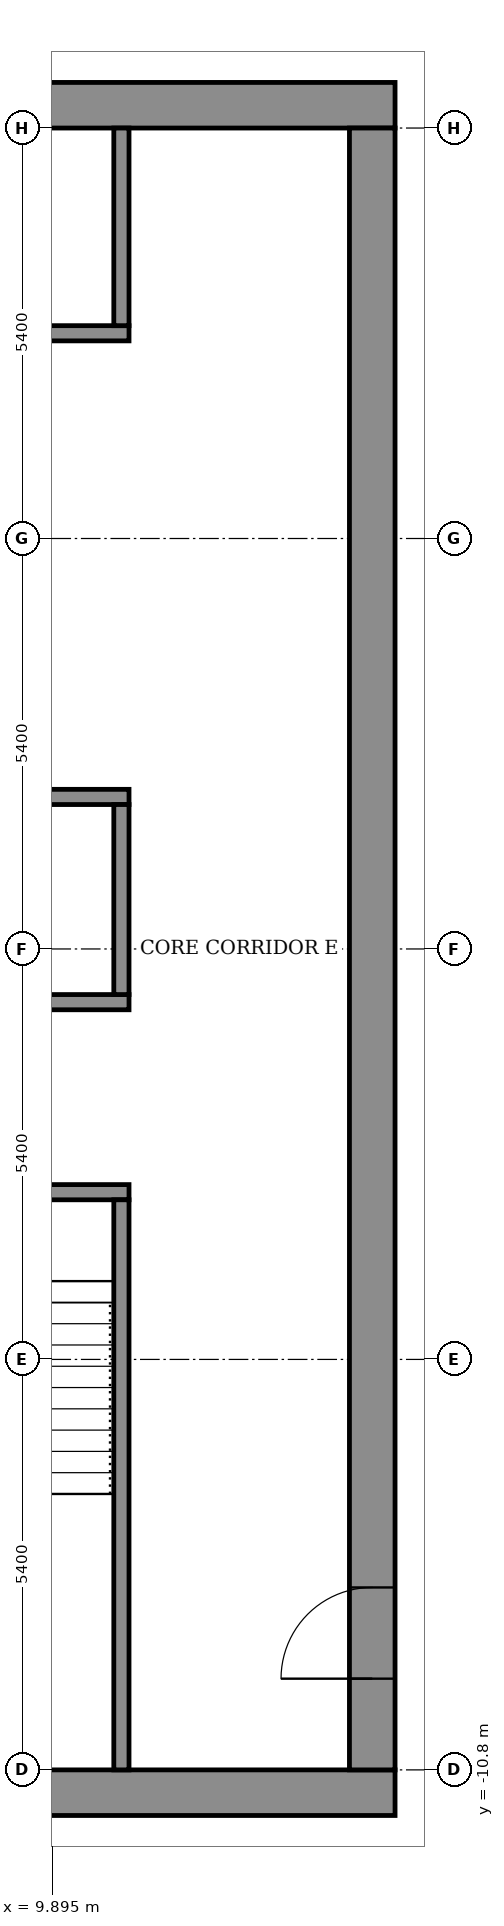
"""IFC4 building model, lengths in metres.
Left out: names, types, materials, properties, quantities, classifications, styles, units other than length and angle.
Written with IfcOpenShell. Run it as: python <this file> out.ifc"""

import sys

from ifc_helpers import new_model, si_unit, direction, frame, frame_2d, origin, place, context, subcontext, project, spatial, rectangle, extrude, element, fill, save


model = new_model("IFC4")
c1 = context("Model", 3, precision=1e-05, world=origin(), true_north=direction((0.0, 1.0)))
c2 = subcontext(c1, "Body", "Model", "MODEL_VIEW")
j1 = project(units=[si_unit("LENGTHUNIT", "METRE"), si_unit("PLANEANGLEUNIT", "RADIAN")], contexts=[c1])
p1 = place(None, origin())
s1 = spatial("IfcSite", under=j1, at=p1, CompositionType="ELEMENT")
p2 = place(p1, origin())
s2 = spatial("IfcBuilding", under=s1, at=p2, CompositionType="ELEMENT")
p3 = place(p2, frame((0.0, 0.0, 334.3)))
s3 = spatial("IfcBuildingStorey", under=s2, at=p3, CompositionType="ELEMENT", Elevation=334.3)
for number, where, z_axis, x_axis in (
    (1, (-14.4, -11.1, 0.0), (0.0, 0.0, 1.0), (1.0, 0.0, 0.0)),
    (2, (-14.4, 11.1, 0.0), (0.0, 0.0, 1.0), (1.0, 0.0, 0.0)),
):
    element("IfcWall", number, at=place(p3, frame(where, z_axis=z_axis, x_axis=x_axis)), inside=s3, PredefinedType="SHEAR", context=c2, shape_type="SweptSolid", body=[
        extrude(rectangle(XDim=28.8, YDim=0.6, at=frame_2d((14.4, 0.0))), origin(), (0.0, 0.0, 1.0), 3.6),
    ])
p4 = place(p3, frame((14.1, -10.8, 0.0), z_axis=(0.0, 0.0, 1.0), x_axis=(0.0, 1.0, 0.0)))
e3 = element("IfcWall", 3, at=p4, inside=s3, PredefinedType="SHEAR", context=c2, shape_type="SweptSolid", body=[
    extrude(rectangle(XDim=21.6, YDim=0.6, at=frame_2d((10.8, 0.0))), origin(), (0.0, 0.0, 1.0), 3.6),
])
p5 = place(p4, frame((1.2, 0.0, 0.0)))
e4 = element("IfcOpeningElement", 4, at=p5, cuts=e3, PredefinedType="OPENING", context=c2, shape_type="SweptSolid", body=[
    extrude(rectangle(XDim=1.2, YDim=2.1, at=frame_2d((0.6, 1.05))), frame((0.0, 0.31, 0.0), z_axis=(0.0, -1.0, 0.0), x_axis=(1.0, 0.0, 0.0)), (0.0, 0.0, 1.0), 0.62),
])
p6 = place(p3, frame((-10.9, -3.2, 0.0), z_axis=(0.0, 0.0, 1.0), x_axis=(1.0, 0.0, 0.0)))
e5 = element("IfcWall", 5, at=p6, inside=s3, PredefinedType="SHEAR", context=c2, shape_type="SweptSolid", body=[
    extrude(rectangle(XDim=21.8, YDim=0.2, at=frame_2d((10.9, 0.0))), origin(), (0.0, 0.0, 1.0), 3.05),
])
p7 = place(p6, frame((1.075, 0.0, 0.0)))
e6 = element("IfcOpeningElement", 6, at=p7, cuts=e5, PredefinedType="OPENING", context=c2, shape_type="SweptSolid", body=[
    extrude(rectangle(XDim=1.1, YDim=2.1, at=frame_2d((0.55, 1.05))), frame((0.0, 0.11, 0.0), z_axis=(0.0, -1.0, 0.0), x_axis=(1.0, 0.0, 0.0)), (0.0, 0.0, 1.0), 0.22),
])
p8 = place(p6, frame((10.325, 0.0, 0.0)))
e7 = element("IfcOpeningElement", 7, at=p8, cuts=e5, PredefinedType="OPENING", context=c2, shape_type="SweptSolid", body=[
    extrude(rectangle(XDim=1.1, YDim=2.1, at=frame_2d((0.55, 1.05))), frame((0.0, 0.11, 0.0), z_axis=(0.0, -1.0, 0.0), x_axis=(1.0, 0.0, 0.0)), (0.0, 0.0, 1.0), 0.22),
])
p9 = place(p6, frame((19.625, 0.0, 0.0)))
e8 = element("IfcOpeningElement", 8, at=p9, cuts=e5, PredefinedType="OPENING", context=c2, shape_type="SweptSolid", body=[
    extrude(rectangle(XDim=1.1, YDim=2.1, at=frame_2d((0.55, 1.05))), frame((0.0, 0.11, 0.0), z_axis=(0.0, -1.0, 0.0), x_axis=(1.0, 0.0, 0.0)), (0.0, 0.0, 1.0), 0.22),
])
p10 = place(p6, frame((5.7, 0.0, 0.0)))
e9 = element("IfcOpeningElement", 9, at=p10, cuts=e5, PredefinedType="OPENING", context=c2, shape_type="SweptSolid", body=[
    extrude(rectangle(XDim=1.1, YDim=2.1, at=frame_2d((0.55, 1.05))), frame((0.0, 0.11, 0.0), z_axis=(0.0, -1.0, 0.0), x_axis=(1.0, 0.0, 0.0)), (0.0, 0.0, 1.0), 0.22),
])
p11 = place(p6, frame((14.975, 0.0, 0.0)))
e10 = element("IfcOpeningElement", 10, at=p11, cuts=e5, PredefinedType="OPENING", context=c2, shape_type="SweptSolid", body=[
    extrude(rectangle(XDim=1.1, YDim=2.1, at=frame_2d((0.55, 1.05))), frame((0.0, 0.11, 0.0), z_axis=(0.0, -1.0, 0.0), x_axis=(1.0, 0.0, 0.0)), (0.0, 0.0, 1.0), 0.22),
])
p12 = place(p3, frame((-10.9, -0.7, 0.0), z_axis=(0.0, 0.0, 1.0), x_axis=(1.0, 0.0, 0.0)))
e11 = element("IfcWall", 11, at=p12, inside=s3, PredefinedType="SHEAR", context=c2, shape_type="SweptSolid", body=[
    extrude(rectangle(XDim=21.8, YDim=0.2, at=frame_2d((10.9, 0.0))), origin(), (0.0, 0.0, 1.0), 3.05),
])
p13 = place(p3, frame((-10.9, 2.0, 0.0), z_axis=(0.0, 0.0, 1.0), x_axis=(1.0, 0.0, 0.0)))
e12 = element("IfcWall", 12, at=p13, inside=s3, PredefinedType="SHEAR", context=c2, shape_type="SweptSolid", body=[
    extrude(rectangle(XDim=21.8, YDim=0.2, at=frame_2d((10.9, 0.0))), origin(), (0.0, 0.0, 1.0), 3.05),
])
p14 = place(p13, frame((4.95, 0.0, 0.0)))
e13 = element("IfcOpeningElement", 13, at=p14, cuts=e12, PredefinedType="OPENING", context=c2, shape_type="SweptSolid", body=[
    extrude(rectangle(XDim=1.1, YDim=2.1, at=frame_2d((0.55, 1.05))), frame((0.0, 0.11, 0.0), z_axis=(0.0, -1.0, 0.0), x_axis=(1.0, 0.0, 0.0)), (0.0, 0.0, 1.0), 0.22),
])
p15 = place(p13, frame((7.65, 0.0, 0.0)))
e14 = element("IfcOpeningElement", 14, at=p15, cuts=e12, PredefinedType="OPENING", context=c2, shape_type="SweptSolid", body=[
    extrude(rectangle(XDim=1.1, YDim=2.1, at=frame_2d((0.55, 1.05))), frame((0.0, 0.11, 0.0), z_axis=(0.0, -1.0, 0.0), x_axis=(1.0, 0.0, 0.0)), (0.0, 0.0, 1.0), 0.22),
])
p16 = place(p13, frame((10.35, 0.0, 0.0)))
e15 = element("IfcOpeningElement", 15, at=p16, cuts=e12, PredefinedType="OPENING", context=c2, shape_type="SweptSolid", body=[
    extrude(rectangle(XDim=1.1, YDim=2.1, at=frame_2d((0.55, 1.05))), frame((0.0, 0.11, 0.0), z_axis=(0.0, -1.0, 0.0), x_axis=(1.0, 0.0, 0.0)), (0.0, 0.0, 1.0), 0.22),
])
p17 = place(p13, frame((1.675, 0.0, 0.0)))
e16 = element("IfcOpeningElement", 16, at=p17, cuts=e12, PredefinedType="OPENING", context=c2, shape_type="SweptSolid", body=[
    extrude(rectangle(XDim=0.9, YDim=2.1, at=frame_2d((0.45, 1.05))), frame((0.0, 0.11, 0.0), z_axis=(0.0, -1.0, 0.0), x_axis=(1.0, 0.0, 0.0)), (0.0, 0.0, 1.0), 0.22),
])
p18 = place(p13, frame((14.5, 0.0, 0.0)))
e17 = element("IfcOpeningElement", 17, at=p18, cuts=e12, PredefinedType="OPENING", context=c2, shape_type="SweptSolid", body=[
    extrude(rectangle(XDim=0.9, YDim=2.1, at=frame_2d((0.45, 1.05))), frame((0.0, 0.11, 0.0), z_axis=(0.0, -1.0, 0.0), x_axis=(1.0, 0.0, 0.0)), (0.0, 0.0, 1.0), 0.22),
])
p19 = place(p13, frame((19.225, 0.0, 0.0)))
e18 = element("IfcOpeningElement", 18, at=p19, cuts=e12, PredefinedType="OPENING", context=c2, shape_type="SweptSolid", body=[
    extrude(rectangle(XDim=0.9, YDim=2.1, at=frame_2d((0.45, 1.05))), frame((0.0, 0.11, 0.0), z_axis=(0.0, -1.0, 0.0), x_axis=(1.0, 0.0, 0.0)), (0.0, 0.0, 1.0), 0.22),
])
p20 = place(p3, frame((-10.9, 8.1, 0.0), z_axis=(0.0, 0.0, 1.0), x_axis=(1.0, 0.0, 0.0)))
e19 = element("IfcWall", 19, at=p20, inside=s3, PredefinedType="SHEAR", context=c2, shape_type="SweptSolid", body=[
    extrude(rectangle(XDim=21.8, YDim=0.2, at=frame_2d((10.9, 0.0))), origin(), (0.0, 0.0, 1.0), 3.05),
])
p21 = place(p20, frame((4.95, 0.0, 0.0)))
e20 = element("IfcOpeningElement", 20, at=p21, cuts=e19, PredefinedType="OPENING", context=c2, shape_type="SweptSolid", body=[
    extrude(rectangle(XDim=1.1, YDim=2.1, at=frame_2d((0.55, 1.05))), frame((0.0, 0.11, 0.0), z_axis=(0.0, -1.0, 0.0), x_axis=(1.0, 0.0, 0.0)), (0.0, 0.0, 1.0), 0.22),
])
p22 = place(p20, frame((7.65, 0.0, 0.0)))
e21 = element("IfcOpeningElement", 21, at=p22, cuts=e19, PredefinedType="OPENING", context=c2, shape_type="SweptSolid", body=[
    extrude(rectangle(XDim=1.1, YDim=2.1, at=frame_2d((0.55, 1.05))), frame((0.0, 0.11, 0.0), z_axis=(0.0, -1.0, 0.0), x_axis=(1.0, 0.0, 0.0)), (0.0, 0.0, 1.0), 0.22),
])
p23 = place(p20, frame((10.35, 0.0, 0.0)))
e22 = element("IfcOpeningElement", 22, at=p23, cuts=e19, PredefinedType="OPENING", context=c2, shape_type="SweptSolid", body=[
    extrude(rectangle(XDim=1.1, YDim=2.1, at=frame_2d((0.55, 1.05))), frame((0.0, 0.11, 0.0), z_axis=(0.0, -1.0, 0.0), x_axis=(1.0, 0.0, 0.0)), (0.0, 0.0, 1.0), 0.22),
])
p24 = place(p20, frame((1.675, 0.0, 0.0)))
e23 = element("IfcOpeningElement", 23, at=p24, cuts=e19, PredefinedType="OPENING", context=c2, shape_type="SweptSolid", body=[
    extrude(rectangle(XDim=0.9, YDim=2.1, at=frame_2d((0.45, 1.05))), frame((0.0, 0.11, 0.0), z_axis=(0.0, -1.0, 0.0), x_axis=(1.0, 0.0, 0.0)), (0.0, 0.0, 1.0), 0.22),
])
p25 = place(p20, frame((14.5, 0.0, 0.0)))
e24 = element("IfcOpeningElement", 24, at=p25, cuts=e19, PredefinedType="OPENING", context=c2, shape_type="SweptSolid", body=[
    extrude(rectangle(XDim=0.9, YDim=2.1, at=frame_2d((0.45, 1.05))), frame((0.0, 0.11, 0.0), z_axis=(0.0, -1.0, 0.0), x_axis=(1.0, 0.0, 0.0)), (0.0, 0.0, 1.0), 0.22),
])
p26 = place(p20, frame((19.225, 0.0, 0.0)))
e25 = element("IfcOpeningElement", 25, at=p26, cuts=e19, PredefinedType="OPENING", context=c2, shape_type="SweptSolid", body=[
    extrude(rectangle(XDim=0.9, YDim=2.1, at=frame_2d((0.45, 1.05))), frame((0.0, 0.11, 0.0), z_axis=(0.0, -1.0, 0.0), x_axis=(1.0, 0.0, 0.0)), (0.0, 0.0, 1.0), 0.22),
])
p27 = place(p3, frame((10.8, -10.8, 0.0), z_axis=(0.0, 0.0, 1.0), x_axis=(0.0, 1.0, 0.0)))
e26 = element("IfcWall", 26, at=p27, inside=s3, PredefinedType="SHEAR", context=c2, shape_type="SweptSolid", body=[
    extrude(rectangle(XDim=7.5, YDim=0.2, at=frame_2d((3.75, 0.0))), origin(), (0.0, 0.0, 1.0), 3.05),
])
p28 = place(p3, frame((10.8, -0.6, 0.0), z_axis=(0.0, 0.0, 1.0), x_axis=(0.0, 1.0, 0.0)))
e27 = element("IfcWall", 27, at=p28, inside=s3, PredefinedType="STANDARD", context=c2, shape_type="SweptSolid", body=[
    extrude(rectangle(XDim=2.5, YDim=0.2, at=frame_2d((1.25, 0.0))), origin(), (0.0, 0.0, 1.0), 3.05),
])
p29 = place(p3, frame((10.8, 8.2, 0.0), z_axis=(0.0, 0.0, 1.0), x_axis=(0.0, 1.0, 0.0)))
e28 = element("IfcWall", 28, at=p29, inside=s3, PredefinedType="STANDARD", context=c2, shape_type="SweptSolid", body=[
    extrude(rectangle(XDim=2.6, YDim=0.2, at=frame_2d((1.3, 0.0))), origin(), (0.0, 0.0, 1.0), 3.05),
])
p30 = place(p5, origin())
e29 = element("IfcDoor", 29, at=p30, inside=s3, OperationType="DOUBLE_DOOR_SINGLE_SWING", PredefinedType="DOOR", context=c2, shape_type="SweptSolid", body=[
    extrude(rectangle(XDim=1.2, YDim=2.1, at=frame_2d((0.6, 1.05))), frame((0.0, 0.025, 0.0), z_axis=(0.0, -1.0, 0.0), x_axis=(1.0, 0.0, 0.0)), (0.0, 0.0, 1.0), 0.05),
])
fill(e4, e29)
save(model, sys.argv[1])
